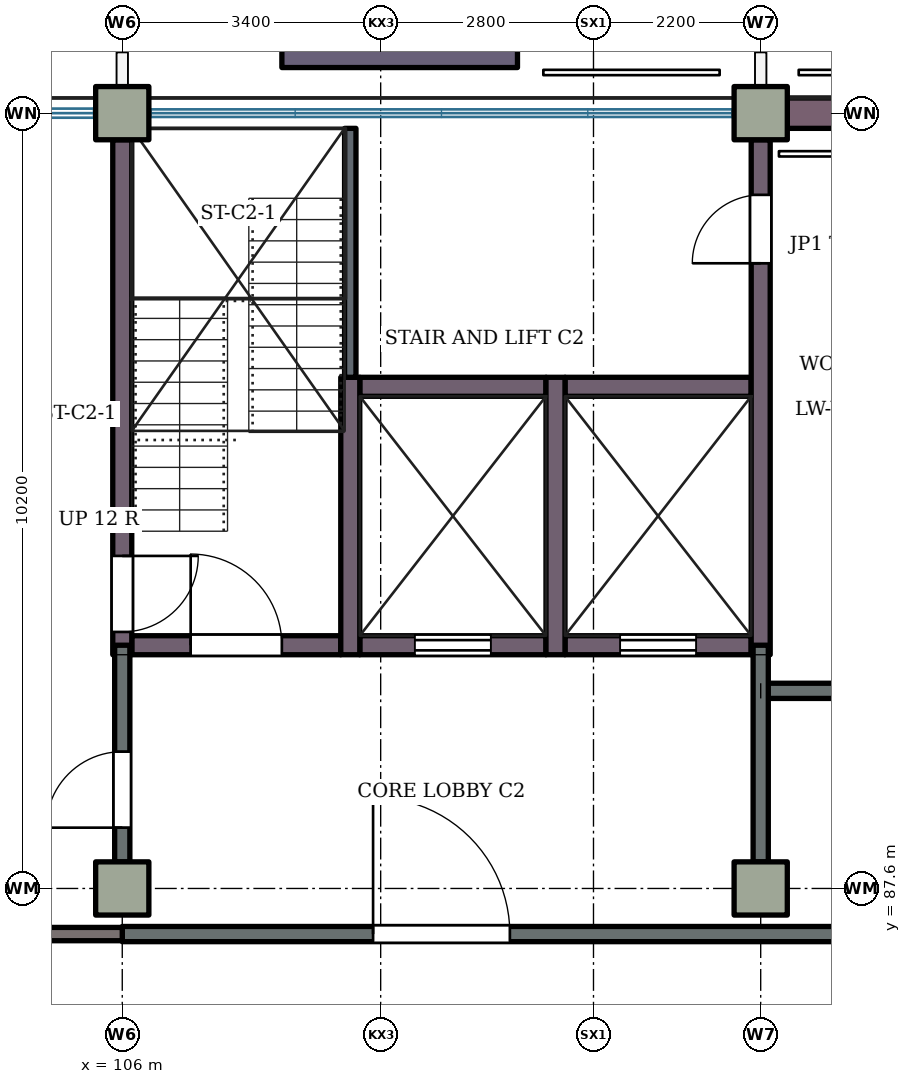
"""IFC4 building model, lengths in metres.
Left out: names, types, materials, properties, quantities, classifications, styles, units other than length and angle.
Written with IfcOpenShell. Run it as: python <this file> out.ifc"""

import sys

from ifc_helpers import new_model, si_unit, direction, frame, frame_2d, origin, origin_2d, place, context, subcontext, project, spatial, rectangle, extrude, element, fill, save


model = new_model("IFC4")
c1 = context("Model", 3, precision=1e-05, world=origin(), true_north=direction((0.0, 1.0)))
c2 = subcontext(c1, "Body", "Model", "MODEL_VIEW")
j1 = project(units=[si_unit("LENGTHUNIT", "METRE"), si_unit("PLANEANGLEUNIT", "RADIAN")], contexts=[c1])
p1 = place(None, origin())
s1 = spatial("IfcSite", under=j1, at=p1, CompositionType="ELEMENT")
p2 = place(p1, origin())
s2 = spatial("IfcBuilding", under=s1, at=p2, CompositionType="ELEMENT")
p3 = place(p2, frame((0.0, 0.0, 4.2)))
s3 = spatial("IfcBuildingStorey", under=s2, at=p3, CompositionType="ELEMENT", Elevation=4.2)
for number, where, z_axis, x_axis in (
    (1, (106.0, 87.6, 0.0), (0.0, 0.0, 1.0), (1.0, 0.0, 0.0)),
    (2, (114.4, 87.6, 0.0), (0.0, 0.0, 1.0), (1.0, 0.0, 0.0)),
    (3, (106.0, 97.8, 0.0), (0.0, 0.0, 1.0), (1.0, 0.0, 0.0)),
    (4, (114.4, 97.8, 0.0), (0.0, 0.0, 1.0), (1.0, 0.0, 0.0)),
):
    element("IfcColumn", number, at=place(p3, frame(where, z_axis=z_axis, x_axis=x_axis)), inside=s3, PredefinedType="COLUMN", context=c2, shape_type="SweptSolid", body=[
        extrude(rectangle(XDim=0.7, YDim=0.7, at=origin_2d()), origin(), (0.0, 0.0, 1.0), 4.2),
    ])
p4 = place(p3, frame((106.125, 90.8, 0.0), z_axis=(0.0, 0.0, 1.0), x_axis=(1.0, 0.0, 0.0)))
e5 = element("IfcWall", 5, at=p4, inside=s3, PredefinedType="SHEAR", context=c2, shape_type="SweptSolid", body=[
    extrude(rectangle(XDim=2.75, YDim=0.25, at=frame_2d((1.375, 0.0))), origin(), (0.0, 0.0, 1.0), 4.2),
])
p5 = place(p4, frame((0.775, 0.0, 0.0)))
e6 = element("IfcOpeningElement", 6, at=p5, cuts=e5, PredefinedType="OPENING", context=c2, shape_type="SweptSolid", body=[
    extrude(rectangle(XDim=1.2, YDim=2.1, at=frame_2d((0.6, 1.05))), frame((0.0, 0.135, 0.0), z_axis=(0.0, -1.0, 0.0), x_axis=(1.0, 0.0, 0.0)), (0.0, 0.0, 1.0), 0.27),
])
p6 = place(p3, frame((109.125, 90.8, 0.0), z_axis=(0.0, 0.0, 1.0), x_axis=(1.0, 0.0, 0.0)))
e7 = element("IfcWall", 7, at=p6, inside=s3, PredefinedType="SHEAR", context=c2, shape_type="SweptSolid", body=[
    extrude(rectangle(XDim=2.45, YDim=0.25, at=frame_2d((1.225, 0.0))), origin(), (0.0, 0.0, 1.0), 4.2),
])
p7 = place(p6, frame((0.725, 0.0, 0.0)))
e8 = element("IfcOpeningElement", 8, at=p7, cuts=e7, PredefinedType="OPENING", context=c2, shape_type="SweptSolid", body=[
    extrude(rectangle(XDim=1.0, YDim=2.1, at=frame_2d((0.5, 1.05))), frame((0.0, 0.135, 0.0), z_axis=(0.0, -1.0, 0.0), x_axis=(1.0, 0.0, 0.0)), (0.0, 0.0, 1.0), 0.27),
])
p8 = place(p3, frame((111.825, 90.8, 0.0), z_axis=(0.0, 0.0, 1.0), x_axis=(1.0, 0.0, 0.0)))
e9 = element("IfcWall", 9, at=p8, inside=s3, PredefinedType="SHEAR", context=c2, shape_type="SweptSolid", body=[
    extrude(rectangle(XDim=2.45, YDim=0.25, at=frame_2d((1.225, 0.0))), origin(), (0.0, 0.0, 1.0), 4.2),
])
p9 = place(p8, frame((0.725, 0.0, 0.0)))
e10 = element("IfcOpeningElement", 10, at=p9, cuts=e9, PredefinedType="OPENING", context=c2, shape_type="SweptSolid", body=[
    extrude(rectangle(XDim=1.0, YDim=2.1, at=frame_2d((0.5, 1.05))), frame((0.0, 0.135, 0.0), z_axis=(0.0, -1.0, 0.0), x_axis=(1.0, 0.0, 0.0)), (0.0, 0.0, 1.0), 0.27),
])
for number, where, z_axis, x_axis in (
    (11, (109.125, 94.2, 0.0), (0.0, 0.0, 1.0), (1.0, 0.0, 0.0)),
    (12, (111.825, 94.2, 0.0), (0.0, 0.0, 1.0), (1.0, 0.0, 0.0)),
):
    element("IfcWall", number, at=place(p3, frame(where, z_axis=z_axis, x_axis=x_axis)), inside=s3, PredefinedType="SHEAR", context=c2, shape_type="SweptSolid", body=[
        extrude(rectangle(XDim=2.45, YDim=0.25, at=frame_2d((1.225, 0.0))), origin(), (0.0, 0.0, 1.0), 4.2),
    ])
p10 = place(p3, frame((106.0, 90.675, 0.0), z_axis=(0.0, 0.0, 1.0), x_axis=(0.0, 1.0, 0.0)))
e13 = element("IfcWall", 13, at=p10, inside=s3, PredefinedType="SHEAR", context=c2, shape_type="SweptSolid", body=[
    extrude(rectangle(XDim=6.775, YDim=0.25, at=frame_2d((3.387, 0.0))), origin(), (0.0, 0.0, 1.0), 4.2),
])
p11 = place(p10, frame((0.3, 0.0, 0.0)))
e14 = element("IfcOpeningElement", 14, at=p11, cuts=e13, PredefinedType="OPENING", context=c2, shape_type="SweptSolid", body=[
    extrude(rectangle(XDim=1.0, YDim=2.1, at=frame_2d((0.5, 1.05))), frame((0.0, 0.135, 0.0), z_axis=(0.0, -1.0, 0.0), x_axis=(1.0, 0.0, 0.0)), (0.0, 0.0, 1.0), 0.27),
])
for number, where, z_axis, x_axis in (
    (15, (109.0, 90.675, 0.0), (0.0, 0.0, 1.0), (0.0, 1.0, 0.0)),
    (16, (111.7, 90.675, 0.0), (0.0, 0.0, 1.0), (0.0, 1.0, 0.0)),
):
    element("IfcWall", number, at=place(p3, frame(where, z_axis=z_axis, x_axis=x_axis)), inside=s3, PredefinedType="SHEAR", context=c2, shape_type="SweptSolid", body=[
        extrude(rectangle(XDim=3.65, YDim=0.25, at=frame_2d((1.825, 0.0))), origin(), (0.0, 0.0, 1.0), 4.2),
    ])
p12 = place(p3, frame((114.4, 90.675, 0.0), z_axis=(0.0, 0.0, 1.0), x_axis=(0.0, 1.0, 0.0)))
e17 = element("IfcWall", 17, at=p12, inside=s3, PredefinedType="SHEAR", context=c2, shape_type="SweptSolid", body=[
    extrude(rectangle(XDim=6.775, YDim=0.25, at=frame_2d((3.387, 0.0))), origin(), (0.0, 0.0, 1.0), 4.2),
])
p13 = place(p12, frame((5.15, 0.0, 0.0)))
e18 = element("IfcOpeningElement", 18, at=p13, cuts=e17, PredefinedType="OPENING", context=c2, shape_type="SweptSolid", body=[
    extrude(rectangle(XDim=0.9, YDim=2.1, at=frame_2d((0.45, 1.05))), frame((0.0, 0.135, 0.0), z_axis=(0.0, -1.0, 0.0), x_axis=(1.0, 0.0, 0.0)), (0.0, 0.0, 1.0), 0.27),
])
p14 = place(p3, frame((114.75, 97.8, 0.0), z_axis=(0.0, 0.0, 1.0), x_axis=(1.0, 0.0, 0.0)))
e19 = element("IfcWall", 19, at=p14, inside=s3, PredefinedType="SOLIDWALL", context=c2, shape_type="SweptSolid", body=[
    extrude(rectangle(XDim=7.7, YDim=0.4, at=frame_2d((3.85, 0.0))), origin(), (0.0, 0.0, 1.0), 3.32),
])
p15 = place(p14, frame((0.75, 0.0, 2.1)))
e20 = element("IfcOpeningElement", 20, at=p15, cuts=e19, PredefinedType="OPENING", context=c2, shape_type="SweptSolid", body=[
    extrude(rectangle(XDim=0.6, YDim=0.9, at=frame_2d((0.3, 0.45))), frame((0.0, 0.21, 0.0), z_axis=(0.0, -1.0, 0.0), x_axis=(1.0, 0.0, 0.0)), (0.0, 0.0, 1.0), 0.42),
])
p16 = place(p14, frame((3.475, 0.0, 2.1)))
e21 = element("IfcOpeningElement", 21, at=p16, cuts=e19, PredefinedType="OPENING", context=c2, shape_type="SweptSolid", body=[
    extrude(rectangle(XDim=0.75, YDim=0.9, at=frame_2d((0.375, 0.45))), frame((0.0, 0.21, 0.0), z_axis=(0.0, -1.0, 0.0), x_axis=(1.0, 0.0, 0.0)), (0.0, 0.0, 1.0), 0.42),
])
p17 = place(p14, frame((6.35, 0.0, 2.1)))
e22 = element("IfcOpeningElement", 22, at=p17, cuts=e19, PredefinedType="OPENING", context=c2, shape_type="SweptSolid", body=[
    extrude(rectangle(XDim=0.6, YDim=0.9, at=frame_2d((0.3, 0.45))), frame((0.0, 0.21, 0.0), z_axis=(0.0, -1.0, 0.0), x_axis=(1.0, 0.0, 0.0)), (0.0, 0.0, 1.0), 0.42),
])
p18 = place(p3, frame((108.1, 98.9, 0.0), z_axis=(0.0, 0.0, 1.0), x_axis=(1.0, 0.0, 0.0)))
e23 = element("IfcWall", 23, at=p18, inside=s3, PredefinedType="STANDARD", context=c2, shape_type="SweptSolid", body=[
    extrude(rectangle(XDim=3.1, YDim=1.0, at=frame_2d((1.55, 0.0))), origin(), (0.0, 0.0, 1.0), 4.2),
])
p19 = place(p3, frame((106.0, 87.0, 0.0), z_axis=(0.0, 0.0, 1.0), x_axis=(1.0, 0.0, 0.0)))
e24 = element("IfcWall", 24, at=p19, inside=s3, PredefinedType="PARTITIONING", context=c2, shape_type="SweptSolid", body=[
    extrude(rectangle(XDim=33.25, YDim=0.2, at=frame_2d((16.625, 0.0))), origin(), (0.0, 0.0, 1.0), 3.92),
])
p20 = place(p19, frame((3.3, 0.0, 0.0)))
e25 = element("IfcOpeningElement", 25, at=p20, cuts=e24, PredefinedType="OPENING", context=c2, shape_type="SweptSolid", body=[
    extrude(rectangle(XDim=1.8, YDim=2.1, at=frame_2d((0.9, 1.05))), frame((0.0, 0.11, 0.0), z_axis=(0.0, -1.0, 0.0), x_axis=(1.0, 0.0, 0.0)), (0.0, 0.0, 1.0), 0.22),
])
p21 = place(p19, frame((11.7, 0.0, 0.0)))
e26 = element("IfcOpeningElement", 26, at=p21, cuts=e24, PredefinedType="OPENING", context=c2, shape_type="SweptSolid", body=[
    extrude(rectangle(XDim=1.8, YDim=2.1, at=frame_2d((0.9, 1.05))), frame((0.0, 0.11, 0.0), z_axis=(0.0, -1.0, 0.0), x_axis=(1.0, 0.0, 0.0)), (0.0, 0.0, 1.0), 0.22),
])
p22 = place(p19, frame((20.1, 0.0, 0.0)))
e27 = element("IfcOpeningElement", 27, at=p22, cuts=e24, PredefinedType="OPENING", context=c2, shape_type="SweptSolid", body=[
    extrude(rectangle(XDim=1.8, YDim=2.1, at=frame_2d((0.9, 1.05))), frame((0.0, 0.11, 0.0), z_axis=(0.0, -1.0, 0.0), x_axis=(1.0, 0.0, 0.0)), (0.0, 0.0, 1.0), 0.22),
])
p23 = place(p19, frame((28.5, 0.0, 0.0)))
e28 = element("IfcOpeningElement", 28, at=p23, cuts=e24, PredefinedType="OPENING", context=c2, shape_type="SweptSolid", body=[
    extrude(rectangle(XDim=1.8, YDim=2.1, at=frame_2d((0.9, 1.05))), frame((0.0, 0.11, 0.0), z_axis=(0.0, -1.0, 0.0), x_axis=(1.0, 0.0, 0.0)), (0.0, 0.0, 1.0), 0.22),
])
p24 = place(p3, frame((89.2, 87.0, 0.0), z_axis=(0.0, 0.0, 1.0), x_axis=(1.0, 0.0, 0.0)))
e29 = element("IfcWall", 29, at=p24, inside=s3, PredefinedType="PARTITIONING", context=c2, shape_type="SweptSolid", body=[
    extrude(rectangle(XDim=16.8, YDim=0.175, at=frame_2d((8.4, 0.0))), origin(), (0.0, 0.0, 1.0), 3.92),
])
p25 = place(p24, frame((8.8, 0.0, 0.0)))
e30 = element("IfcOpeningElement", 30, at=p25, cuts=e29, PredefinedType="OPENING", context=c2, shape_type="SweptSolid", body=[
    extrude(rectangle(XDim=1.0, YDim=2.1, at=frame_2d((0.5, 1.05))), frame((0.0, 0.097, 0.0), z_axis=(0.0, -1.0, 0.0), x_axis=(1.0, 0.0, 0.0)), (0.0, 0.0, 1.0), 0.195),
])
p26 = place(p3, frame((114.4, 90.2, 0.0), z_axis=(0.0, 0.0, 1.0), x_axis=(1.0, 0.0, 0.0)))
e31 = element("IfcWall", 31, at=p26, inside=s3, PredefinedType="PARTITIONING", context=c2, shape_type="SweptSolid", body=[
    extrude(rectangle(XDim=8.4, YDim=0.2, at=frame_2d((4.2, 0.0))), origin(), (0.0, 0.0, 1.0), 3.92),
])
p27 = place(p26, frame((1.35, 0.0, 0.0)))
e32 = element("IfcOpeningElement", 32, at=p27, cuts=e31, PredefinedType="OPENING", context=c2, shape_type="SweptSolid", body=[
    extrude(rectangle(XDim=0.9, YDim=2.1, at=frame_2d((0.45, 1.05))), frame((0.0, 0.11, 0.0), z_axis=(0.0, -1.0, 0.0), x_axis=(1.0, 0.0, 0.0)), (0.0, 0.0, 1.0), 0.22),
])
p28 = place(p26, frame((4.225, 0.0, 0.0)))
e33 = element("IfcOpeningElement", 33, at=p28, cuts=e31, PredefinedType="OPENING", context=c2, shape_type="SweptSolid", body=[
    extrude(rectangle(XDim=1.15, YDim=2.1, at=frame_2d((0.575, 1.05))), frame((0.0, 0.11, 0.0), z_axis=(0.0, -1.0, 0.0), x_axis=(1.0, 0.0, 0.0)), (0.0, 0.0, 1.0), 0.22),
])
p29 = place(p26, frame((6.15, 0.0, 0.0)))
e34 = element("IfcOpeningElement", 34, at=p29, cuts=e31, PredefinedType="OPENING", context=c2, shape_type="SweptSolid", body=[
    extrude(rectangle(XDim=0.9, YDim=2.1, at=frame_2d((0.45, 1.05))), frame((0.0, 0.11, 0.0), z_axis=(0.0, -1.0, 0.0), x_axis=(1.0, 0.0, 0.0)), (0.0, 0.0, 1.0), 0.22),
])
p30 = place(p3, frame((106.0, 87.95, 0.0), z_axis=(0.0, 0.0, 1.0), x_axis=(0.0, 1.0, 0.0)))
e35 = element("IfcWall", 35, at=p30, inside=s3, PredefinedType="PARTITIONING", context=c2, shape_type="SweptSolid", body=[
    extrude(rectangle(XDim=2.85, YDim=0.2, at=frame_2d((1.425, 0.0))), origin(), (0.0, 0.0, 1.0), 3.02),
])
p31 = place(p30, frame((0.45, 0.0, 0.0)))
e36 = element("IfcOpeningElement", 36, at=p31, cuts=e35, PredefinedType="OPENING", context=c2, shape_type="SweptSolid", body=[
    extrude(rectangle(XDim=1.0, YDim=2.1, at=frame_2d((0.5, 1.05))), frame((0.0, 0.11, 0.0), z_axis=(0.0, -1.0, 0.0), x_axis=(1.0, 0.0, 0.0)), (0.0, 0.0, 1.0), 0.22),
])
p32 = place(p3, frame((114.4, 87.95, 0.0), z_axis=(0.0, 0.0, 1.0), x_axis=(0.0, 1.0, 0.0)))
e37 = element("IfcWall", 37, at=p32, inside=s3, PredefinedType="PARTITIONING", context=c2, shape_type="SweptSolid", body=[
    extrude(rectangle(XDim=2.85, YDim=0.2, at=frame_2d((1.425, 0.0))), origin(), (0.0, 0.0, 1.0), 3.02),
])
p33 = place(p3, frame((109.0, 94.325, 0.0), z_axis=(0.0, 0.0, 1.0), x_axis=(0.0, 1.0, 0.0)))
e38 = element("IfcWall", 38, at=p33, inside=s3, PredefinedType="PARTITIONING", context=c2, shape_type="SweptSolid", body=[
    extrude(rectangle(XDim=3.275, YDim=0.15, at=frame_2d((1.638, 0.0))), origin(), (0.0, 0.0, 1.0), 3.92),
])
p34 = place(p31, origin())
e39 = element("IfcDoor", 39, at=p34, inside=s3, OperationType="SINGLE_SWING_LEFT", PredefinedType="DOOR", context=c2, shape_type="SweptSolid", body=[
    extrude(rectangle(XDim=1.0, YDim=2.1, at=frame_2d((0.5, 1.05))), frame((0.0, 0.025, 0.0), z_axis=(0.0, -1.0, 0.0), x_axis=(1.0, 0.0, 0.0)), (0.0, 0.0, 1.0), 0.05),
])
fill(e36, e39)
p35 = place(p11, origin())
e40 = element("IfcDoor", 40, at=p35, inside=s3, OperationType="SINGLE_SWING_RIGHT", PredefinedType="DOOR", context=c2, shape_type="SweptSolid", body=[
    extrude(rectangle(XDim=1.0, YDim=2.1, at=frame_2d((0.5, 1.05))), frame((0.0, 0.025, 0.0), z_axis=(0.0, -1.0, 0.0), x_axis=(1.0, 0.0, 0.0)), (0.0, 0.0, 1.0), 0.05),
])
fill(e14, e40)
p36 = place(p13, origin())
e41 = element("IfcDoor", 41, at=p36, inside=s3, OperationType="SINGLE_SWING_LEFT", PredefinedType="DOOR", context=c2, shape_type="SweptSolid", body=[
    extrude(rectangle(XDim=0.9, YDim=2.1, at=frame_2d((0.45, 1.05))), frame((0.0, 0.025, 0.0), z_axis=(0.0, -1.0, 0.0), x_axis=(1.0, 0.0, 0.0)), (0.0, 0.0, 1.0), 0.05),
])
fill(e18, e41)
p37 = place(p20, origin())
e42 = element("IfcDoor", 42, at=p37, inside=s3, OperationType="DOUBLE_DOOR_SINGLE_SWING", PredefinedType="DOOR", context=c2, shape_type="SweptSolid", body=[
    extrude(rectangle(XDim=1.8, YDim=2.1, at=frame_2d((0.9, 1.05))), frame((0.0, 0.025, 0.0), z_axis=(0.0, -1.0, 0.0), x_axis=(1.0, 0.0, 0.0)), (0.0, 0.0, 1.0), 0.05),
])
fill(e25, e42)
p38 = place(p5, origin())
e43 = element("IfcDoor", 43, at=p38, inside=s3, OperationType="SINGLE_SWING_LEFT", PredefinedType="DOOR", context=c2, shape_type="SweptSolid", body=[
    extrude(rectangle(XDim=1.2, YDim=2.1, at=frame_2d((0.6, 1.05))), frame((0.0, 0.025, 0.0), z_axis=(0.0, -1.0, 0.0), x_axis=(1.0, 0.0, 0.0)), (0.0, 0.0, 1.0), 0.05),
])
fill(e6, e43)
p39 = place(p7, origin())
e44 = element("IfcDoor", 44, at=p39, inside=s3, OperationType="SLIDING_TO_LEFT", PredefinedType="DOOR", context=c2, shape_type="SweptSolid", body=[
    extrude(rectangle(XDim=1.0, YDim=2.1, at=frame_2d((0.5, 1.05))), frame((0.0, 0.025, 0.0), z_axis=(0.0, -1.0, 0.0), x_axis=(1.0, 0.0, 0.0)), (0.0, 0.0, 1.0), 0.05),
])
fill(e8, e44)
p40 = place(p9, origin())
e45 = element("IfcDoor", 45, at=p40, inside=s3, OperationType="SLIDING_TO_LEFT", PredefinedType="DOOR", context=c2, shape_type="SweptSolid", body=[
    extrude(rectangle(XDim=1.0, YDim=2.1, at=frame_2d((0.5, 1.05))), frame((0.0, 0.025, 0.0), z_axis=(0.0, -1.0, 0.0), x_axis=(1.0, 0.0, 0.0)), (0.0, 0.0, 1.0), 0.05),
])
fill(e10, e45)
save(model, sys.argv[1])
